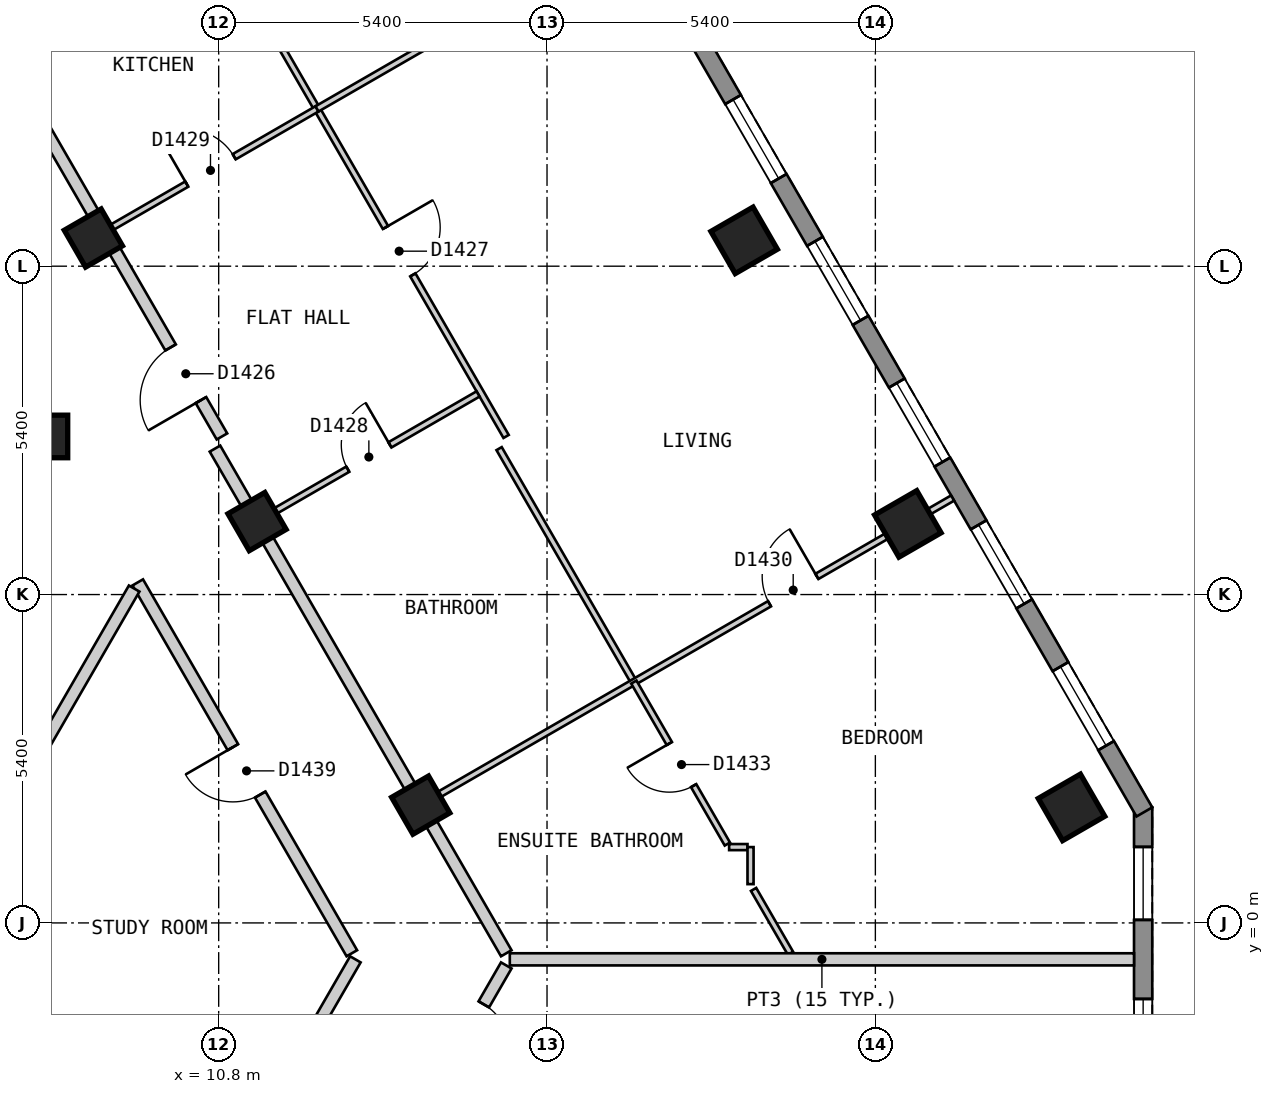
"""IFC4 building model, lengths in metres.
Left out: names, types, materials, properties, quantities, classifications, styles, units other than length and angle.
Written with IfcOpenShell. Run it as: python <this file> out.ifc"""

import sys

from ifc_helpers import new_model, si_unit, direction, frame, frame_2d, origin, origin_2d, place, context, subcontext, project, spatial, polyline, rectangle, outline, extrude, element, fill, save


model = new_model("IFC4")
c1 = context("Model", 3, precision=1e-05, world=origin(), true_north=direction((0.0, 1.0)))
c2 = subcontext(c1, "Body", "Model", "MODEL_VIEW")
j1 = project(units=[si_unit("LENGTHUNIT", "METRE"), si_unit("PLANEANGLEUNIT", "RADIAN")], contexts=[c1])
p1 = place(None, origin())
s1 = spatial("IfcSite", under=j1, at=p1, CompositionType="ELEMENT")
p2 = place(p1, origin())
s2 = spatial("IfcBuilding", under=s1, at=p2, CompositionType="ELEMENT")
p3 = place(p2, frame((0.0, 0.0, 172.2)))
s3 = spatial("IfcBuildingStorey", under=s2, at=p3, CompositionType="ELEMENT", Elevation=172.2)
for number, where, z_axis, x_axis in (
    (1, (24.826, 1.9, 0.0), (0.0, 0.0, 1.0), (-0.5, 0.866, 0.0)),
    (2, (22.134, 6.562, 0.0), (0.0, 0.0, 1.0), (-0.5, 0.866, 0.0)),
    (3, (19.442, 11.225, 0.0), (0.0, 0.0, 1.0), (-0.5, 0.866, 0.0)),
):
    element("IfcColumn", number, at=place(p3, frame(where, z_axis=z_axis, x_axis=x_axis)), inside=s3, PredefinedType="COLUMN", context=c2, shape_type="SweptSolid", body=[
        extrude(rectangle(XDim=0.8, YDim=0.8, at=origin_2d()), origin(), (0.0, 0.0, 1.0), 3.0),
    ])
for number, where, z_axis, x_axis in (
    (4, (14.123, 1.937, 0.0), (0.0, 0.0, 1.0), (-0.5, 0.866, 0.0)),
    (5, (11.431, 6.6, 0.0), (0.0, 0.0, 1.0), (-0.5, 0.866, 0.0)),
    (6, (7.967, 8.0, 0.0), (0.0, 0.0, 1.0), (1.0, 0.0, 0.0)),
    (7, (8.739, 11.263, 0.0), (0.0, 0.0, 1.0), (-0.5, 0.866, 0.0)),
):
    element("IfcColumn", number, at=place(p3, frame(where, z_axis=z_axis, x_axis=x_axis)), inside=s3, PredefinedType="COLUMN", context=c2, shape_type="SweptSolid", body=[
        extrude(rectangle(XDim=0.7, YDim=0.7, at=origin_2d()), origin(), (0.0, 0.0, 1.0), 3.0),
    ])
p4 = place(p3, frame((26.004, -3.1, 0.0), z_axis=(0.0, 0.0, 1.0), x_axis=(0.0, 1.0, 0.0)))
e8 = element("IfcWall", 8, at=p4, inside=s3, PredefinedType="SOLIDWALL", context=c2, shape_type="SweptSolid", body=[
    extrude(outline(polyline([(0.0, -0.15), (5.0, -0.15), (4.92, 0.15), (0.08, 0.15), (0.0, -0.15)])), origin(), (0.0, 0.0, 1.0), 2.7),
])
p5 = place(p4, frame((0.65, 0.0, 0.15)))
e9 = element("IfcOpeningElement", 9, at=p5, cuts=e8, PredefinedType="OPENING", context=c2, shape_type="SweptSolid", body=[
    extrude(rectangle(XDim=1.2, YDim=2.1, at=frame_2d((0.6, 1.05))), frame((0.0, 0.16, 0.0), z_axis=(0.0, -1.0, 0.0), x_axis=(1.0, 0.0, 0.0)), (0.0, 0.0, 1.0), 0.32),
])
p6 = place(p4, frame((3.15, 0.0, 0.15)))
e10 = element("IfcOpeningElement", 10, at=p6, cuts=e8, PredefinedType="OPENING", context=c2, shape_type="SweptSolid", body=[
    extrude(rectangle(XDim=1.2, YDim=2.1, at=frame_2d((0.6, 1.05))), frame((0.0, 0.16, 0.0), z_axis=(0.0, -1.0, 0.0), x_axis=(1.0, 0.0, 0.0)), (0.0, 0.0, 1.0), 0.32),
])
p7 = place(p3, frame((26.024, 1.825, 0.0), z_axis=(0.0, 0.0, 1.0), x_axis=(-0.500010537973, 0.866019319597, 0.0)))
e11 = element("IfcWall", 11, at=p7, inside=s3, PredefinedType="SOLIDWALL", context=c2, shape_type="SweptSolid", body=[
    extrude(outline(polyline([(0.0, -0.15), (22.863, -0.15), (22.783, 0.15), (0.08, 0.15), (0.0, -0.15)])), origin(), (0.0, 0.0, 1.0), 2.7),
])
p8 = place(p7, frame((1.259, 0.0, 0.15)))
e12 = element("IfcOpeningElement", 12, at=p8, cuts=e11, PredefinedType="OPENING", context=c2, shape_type="SweptSolid", body=[
    extrude(rectangle(XDim=1.5, YDim=2.1, at=frame_2d((0.75, 1.05))), frame((0.0, 0.16, 0.0), z_axis=(0.0, -1.0, 0.0), x_axis=(1.0, 0.0, 0.0)), (0.0, 0.0, 1.0), 0.32),
])
p9 = place(p7, frame((3.952, 0.0, 0.15)))
e13 = element("IfcOpeningElement", 13, at=p9, cuts=e11, PredefinedType="OPENING", context=c2, shape_type="SweptSolid", body=[
    extrude(rectangle(XDim=1.5, YDim=2.1, at=frame_2d((0.75, 1.05))), frame((0.0, 0.16, 0.0), z_axis=(0.0, -1.0, 0.0), x_axis=(1.0, 0.0, 0.0)), (0.0, 0.0, 1.0), 0.32),
])
p10 = place(p7, frame((6.644, 0.0, 0.15)))
e14 = element("IfcOpeningElement", 14, at=p10, cuts=e11, PredefinedType="OPENING", context=c2, shape_type="SweptSolid", body=[
    extrude(rectangle(XDim=1.5, YDim=2.1, at=frame_2d((0.75, 1.05))), frame((0.0, 0.16, 0.0), z_axis=(0.0, -1.0, 0.0), x_axis=(1.0, 0.0, 0.0)), (0.0, 0.0, 1.0), 0.32),
])
p11 = place(p7, frame((9.335, 0.0, 0.15)))
e15 = element("IfcOpeningElement", 15, at=p11, cuts=e11, PredefinedType="OPENING", context=c2, shape_type="SweptSolid", body=[
    extrude(rectangle(XDim=1.5, YDim=2.1, at=frame_2d((0.75, 1.05))), frame((0.0, 0.16, 0.0), z_axis=(0.0, -1.0, 0.0), x_axis=(1.0, 0.0, 0.0)), (0.0, 0.0, 1.0), 0.32),
])
p12 = place(p7, frame((12.028, 0.0, 0.15)))
e16 = element("IfcOpeningElement", 16, at=p12, cuts=e11, PredefinedType="OPENING", context=c2, shape_type="SweptSolid", body=[
    extrude(rectangle(XDim=1.5, YDim=2.1, at=frame_2d((0.75, 1.05))), frame((0.0, 0.16, 0.0), z_axis=(0.0, -1.0, 0.0), x_axis=(1.0, 0.0, 0.0)), (0.0, 0.0, 1.0), 0.32),
])
p13 = place(p7, frame((14.72, 0.0, 0.15)))
e17 = element("IfcOpeningElement", 17, at=p13, cuts=e11, PredefinedType="OPENING", context=c2, shape_type="SweptSolid", body=[
    extrude(rectangle(XDim=1.5, YDim=2.1, at=frame_2d((0.75, 1.05))), frame((0.0, 0.16, 0.0), z_axis=(0.0, -1.0, 0.0), x_axis=(1.0, 0.0, 0.0)), (0.0, 0.0, 1.0), 0.32),
])
p14 = place(p7, frame((17.411, 0.0, 0.15)))
e18 = element("IfcOpeningElement", 18, at=p14, cuts=e11, PredefinedType="OPENING", context=c2, shape_type="SweptSolid", body=[
    extrude(rectangle(XDim=1.5, YDim=2.1, at=frame_2d((0.75, 1.05))), frame((0.0, 0.16, 0.0), z_axis=(0.0, -1.0, 0.0), x_axis=(1.0, 0.0, 0.0)), (0.0, 0.0, 1.0), 0.32),
])
p15 = place(p7, frame((20.104, 0.0, 0.15)))
e19 = element("IfcOpeningElement", 19, at=p15, cuts=e11, PredefinedType="OPENING", context=c2, shape_type="SweptSolid", body=[
    extrude(rectangle(XDim=1.5, YDim=2.1, at=frame_2d((0.75, 1.05))), frame((0.0, 0.16, 0.0), z_axis=(0.0, -1.0, 0.0), x_axis=(1.0, 0.0, 0.0)), (0.0, 0.0, 1.0), 0.32),
])
p16 = place(p3, frame((9.469, 5.6, 0.0), z_axis=(0.0, 0.0, 1.0), x_axis=(0.499964524401, -0.866045884662, 0.0)))
e20 = element("IfcWall", 20, at=p16, inside=s3, PredefinedType="PARTITIONING", context=c2, shape_type="SweptSolid", body=[
    extrude(rectangle(XDim=7.042, YDim=0.2, at=frame_2d((3.521, 0.0))), origin(), (0.0, 0.0, 1.0), 2.7),
])
p17 = place(p16, frame((3.129, 0.0, 0.0)))
e21 = element("IfcOpeningElement", 21, at=p17, cuts=e20, PredefinedType="OPENING", context=c2, shape_type="SweptSolid", body=[
    extrude(rectangle(XDim=0.9, YDim=2.1, at=frame_2d((0.45, 1.05))), frame((0.0, 0.11, 0.0), z_axis=(0.0, -1.0, 0.0), x_axis=(1.0, 0.0, 0.0)), (0.0, 0.0, 1.0), 0.22),
])
p18 = place(p3, frame((10.739, 7.8, 0.0), z_axis=(0.0, 0.0, 1.0), x_axis=(0.499964311759, -0.86604600742, 0.0)))
e22 = element("IfcWall", 22, at=p18, inside=s3, PredefinedType="PARTITIONING", context=c2, shape_type="SweptSolid", body=[
    extrude(rectangle(XDim=9.583, YDim=0.2, at=frame_2d((4.792, 0.0))), origin(), (0.0, 0.0, 1.0), 2.7),
])
p19 = place(p3, frame((5.485, 17.3, 0.0), z_axis=(0.0, 0.0, 1.0), x_axis=(0.499965832213, -0.866045129667, 0.0)))
e23 = element("IfcWall", 23, at=p19, inside=s3, PredefinedType="PARTITIONING", context=c2, shape_type="SweptSolid", body=[
    extrude(rectangle(XDim=10.739, YDim=0.2, at=frame_2d((5.369, 0.0))), origin(), (0.0, 0.0, 1.0), 2.7),
])
p20 = place(p19, frame((9.048, 0.0, 0.0)))
e24 = element("IfcOpeningElement", 24, at=p20, cuts=e23, PredefinedType="OPENING", context=c2, shape_type="SweptSolid", body=[
    extrude(rectangle(XDim=1.0, YDim=2.1, at=frame_2d((0.5, 1.05))), frame((0.0, 0.11, 0.0), z_axis=(0.0, -1.0, 0.0), x_axis=(1.0, 0.0, 0.0)), (0.0, 0.0, 1.0), 0.22),
])
p21 = place(p19, frame((0.161, 0.0, 0.0)))
e25 = element("IfcOpeningElement", 25, at=p21, cuts=e23, PredefinedType="OPENING", context=c2, shape_type="SweptSolid", body=[
    extrude(rectangle(XDim=0.9, YDim=2.1, at=frame_2d((0.45, 1.05))), frame((0.0, 0.11, 0.0), z_axis=(0.0, -1.0, 0.0), x_axis=(1.0, 0.0, 0.0)), (0.0, 0.0, 1.0), 0.22),
])
p22 = place(p3, frame((7.028, 1.373, 0.0), z_axis=(0.0, 0.0, 1.0), x_axis=(0.499953126767, 0.866052464367, 0.0)))
e26 = element("IfcWall", 26, at=p22, inside=s3, PredefinedType="PARTITIONING", context=c2, shape_type="SweptSolid", body=[
    extrude(rectangle(XDim=4.764, YDim=0.2, at=frame_2d((2.382, 0.0))), origin(), (0.0, 0.0, 1.0), 2.7),
])
p23 = place(p3, frame((11.777, -2.8, 0.0), z_axis=(0.0, 0.0, 1.0), x_axis=(0.500085537782, 0.86597601289, 0.0)))
e27 = element("IfcWall", 27, at=p23, inside=s3, PredefinedType="PARTITIONING", context=c2, shape_type="SweptSolid", body=[
    extrude(rectangle(XDim=2.542, YDim=0.2, at=frame_2d((1.271, 0.0))), origin(), (0.0, 0.0, 1.0), 2.7),
])
p24 = place(p3, frame((14.318, -2.8, 0.0), z_axis=(0.0, 0.0, 1.0), x_axis=(0.49964693309, 0.866229151122, 0.0)))
e28 = element("IfcWall", 28, at=p24, inside=s3, PredefinedType="PARTITIONING", context=c2, shape_type="SweptSolid", body=[
    extrude(rectangle(XDim=2.426, YDim=0.2, at=frame_2d((1.213, 0.0))), origin(), (0.0, 0.0, 1.0), 2.7),
])
p25 = place(p24, frame((0.886, 0.0, 0.0)))
e29 = element("IfcOpeningElement", 29, at=p25, cuts=e28, PredefinedType="OPENING", context=c2, shape_type="SweptSolid", body=[
    extrude(rectangle(XDim=0.8, YDim=2.1, at=frame_2d((0.4, 1.05))), frame((0.0, 0.11, 0.0), z_axis=(0.0, -1.0, 0.0), x_axis=(1.0, 0.0, 0.0)), (0.0, 0.0, 1.0), 0.22),
])
p26 = place(p3, frame((15.412, 7.8, 0.0), z_axis=(0.0, 0.0, 1.0), x_axis=(0.499882970317, -0.866092960361, 0.0)))
e30 = element("IfcWall", 30, at=p26, inside=s3, PredefinedType="PARTITIONING", context=c2, shape_type="SweptSolid", body=[
    extrude(rectangle(XDim=4.433, YDim=0.1, at=frame_2d((2.216, 0.0))), origin(), (0.0, 0.0, 1.0), 2.7),
])
p27 = place(p3, frame((19.597, 0.551, 0.0), z_axis=(0.0, 0.0, 1.0), x_axis=(0.500576018574, -0.86569258379, 0.0)))
e31 = element("IfcWall", 31, at=p27, inside=s3, PredefinedType="PARTITIONING", context=c2, shape_type="SweptSolid", body=[
    extrude(rectangle(XDim=1.213, YDim=0.1, at=frame_2d((0.606, 0.0))), origin(), (0.0, 0.0, 1.0), 2.7),
])
p28 = place(p3, frame((9.827, 17.874, 0.0), z_axis=(0.0, 0.0, 1.0), x_axis=(0.499962189394, -0.866047232647, 0.0)))
e32 = element("IfcWall", 32, at=p28, inside=s3, PredefinedType="PARTITIONING", context=c2, shape_type="SweptSolid", body=[
    extrude(rectangle(XDim=11.401, YDim=0.1, at=frame_2d((5.701, 0.0))), origin(), (0.0, 0.0, 1.0), 2.7),
])
p29 = place(p28, frame((7.433, 0.0, 0.0)))
e33 = element("IfcOpeningElement", 33, at=p29, cuts=e32, PredefinedType="OPENING", context=c2, shape_type="SweptSolid", body=[
    extrude(rectangle(XDim=0.9, YDim=2.1, at=frame_2d((0.45, 1.05))), frame((0.0, 0.06, 0.0), z_axis=(0.0, -1.0, 0.0), x_axis=(1.0, 0.0, 0.0)), (0.0, 0.0, 1.0), 0.12),
])
p30 = place(p3, frame((19.195, 1.247, 0.0), z_axis=(0.0, 0.0, 1.0), x_axis=(1.0, 0.0, 0.0)))
e34 = element("IfcWall", 34, at=p30, inside=s3, PredefinedType="PARTITIONING", context=c2, shape_type="SweptSolid", body=[
    extrude(rectangle(XDim=0.302, YDim=0.1, at=frame_2d((0.151, 0.0))), origin(), (0.0, 0.0, 1.0), 2.7),
])
p31 = place(p3, frame((19.547, 0.638, 0.0), z_axis=(0.0, 0.0, 1.0), x_axis=(0.0, 1.0, 0.0)))
e35 = element("IfcWall", 35, at=p31, inside=s3, PredefinedType="PARTITIONING", context=c2, shape_type="SweptSolid", body=[
    extrude(rectangle(XDim=0.609, YDim=0.1, at=frame_2d((0.305, 0.0))), origin(), (0.0, 0.0, 1.0), 2.7),
])
p32 = place(p3, frame((14.21, 1.987, 0.0), z_axis=(0.0, 0.0, 1.0), x_axis=(0.866022959057, 0.500004234368, 0.0)))
e36 = element("IfcWall", 36, at=p32, inside=s3, PredefinedType="PARTITIONING", context=c2, shape_type="SweptSolid", body=[
    extrude(rectangle(XDim=10.0, YDim=0.1, at=frame_2d((5.0, 0.0))), origin(), (0.0, 0.0, 1.0), 2.7),
])
p33 = place(p32, frame((6.523, 0.0, 0.0)))
e37 = element("IfcOpeningElement", 37, at=p33, cuts=e36, PredefinedType="OPENING", context=c2, shape_type="SweptSolid", body=[
    extrude(rectangle(XDim=0.9, YDim=2.1, at=frame_2d((0.45, 1.05))), frame((0.0, 0.06, 0.0), z_axis=(0.0, -1.0, 0.0), x_axis=(1.0, 0.0, 0.0)), (0.0, 0.0, 1.0), 0.12),
])
p34 = place(p3, frame((11.518, 6.65, 0.0), z_axis=(0.0, 0.0, 1.0), x_axis=(0.865949381454, 0.500131651427, 0.0)))
e38 = element("IfcWall", 38, at=p34, inside=s3, PredefinedType="PARTITIONING", context=c2, shape_type="SweptSolid", body=[
    extrude(rectangle(XDim=4.097, YDim=0.1, at=frame_2d((2.049, 0.0))), origin(), (0.0, 0.0, 1.0), 2.7),
])
p35 = place(p34, frame((1.623, 0.0, 0.0)))
e39 = element("IfcOpeningElement", 39, at=p35, cuts=e38, PredefinedType="OPENING", context=c2, shape_type="SweptSolid", body=[
    extrude(rectangle(XDim=0.8, YDim=2.1, at=frame_2d((0.4, 1.05))), frame((0.0, 0.06, 0.0), z_axis=(0.0, -1.0, 0.0), x_axis=(1.0, 0.0, 0.0)), (0.0, 0.0, 1.0), 0.12),
])
p36 = place(p3, frame((8.999, 11.413, 0.0), z_axis=(0.0, 0.0, 1.0), x_axis=(0.865969252911, 0.500097243556, 0.0)))
e40 = element("IfcWall", 40, at=p36, inside=s3, PredefinedType="PARTITIONING", context=c2, shape_type="SweptSolid", body=[
    extrude(rectangle(XDim=3.947, YDim=0.1, at=frame_2d((1.974, 0.0))), origin(), (0.0, 0.0, 1.0), 2.7),
])
p37 = place(p36, frame((1.474, 0.0, 0.0)))
e41 = element("IfcOpeningElement", 41, at=p37, cuts=e40, PredefinedType="OPENING", context=c2, shape_type="SweptSolid", body=[
    extrude(rectangle(XDim=0.9, YDim=2.1, at=frame_2d((0.45, 1.05))), frame((0.0, 0.06, 0.0), z_axis=(0.0, -1.0, 0.0), x_axis=(1.0, 0.0, 0.0)), (0.0, 0.0, 1.0), 0.12),
])
p38 = place(p3, frame((15.588, -0.599, 0.0), z_axis=(0.0, 0.0, 1.0), x_axis=(1.0, 0.0, 0.0)))
e42 = element("IfcWall", 42, at=p38, inside=s3, PredefinedType="PARTITIONING", context=c2, shape_type="SweptSolid", body=[
    extrude(rectangle(XDim=10.266, YDim=0.2, at=frame_2d((5.133, 0.0))), origin(), (0.0, 0.0, 1.0), 2.7),
])
p39 = place(p3, frame((7.448, 14.1, 0.0), z_axis=(0.0, 0.0, 1.0), x_axis=(0.500013426303, 0.866017651966, 0.0)))
e43 = element("IfcWall", 43, at=p39, inside=s3, PredefinedType="PARTITIONING", context=c2, shape_type="SweptSolid", body=[
    extrude(rectangle(XDim=4.358, YDim=0.2, at=frame_2d((2.179, 0.0))), origin(), (0.0, 0.0, 1.0), 2.7),
])
p40 = place(p3, frame((17.628, 3.961, 0.0), z_axis=(0.0, 0.0, 1.0), x_axis=(0.50003162148, -0.866007146345, 0.0)))
e44 = element("IfcWall", 44, at=p40, inside=s3, PredefinedType="PARTITIONING", context=c2, shape_type="SweptSolid", body=[
    extrude(rectangle(XDim=3.076, YDim=0.1, at=frame_2d((1.538, 0.0))), origin(), (0.0, 0.0, 1.0), 2.7),
])
p41 = place(p40, frame((1.167, 0.0, 0.0)))
e45 = element("IfcOpeningElement", 45, at=p41, cuts=e44, PredefinedType="OPENING", context=c2, shape_type="SweptSolid", body=[
    extrude(rectangle(XDim=0.8, YDim=2.1, at=frame_2d((0.4, 1.05))), frame((0.0, 0.06, 0.0), z_axis=(0.0, -1.0, 0.0), x_axis=(1.0, 0.0, 0.0)), (0.0, 0.0, 1.0), 0.12),
])
p42 = place(p3, frame((12.417, 13.387, 0.0), z_axis=(0.0, 0.0, 1.0), x_axis=(0.866070981966, 0.499921047963, 0.0)))
e46 = element("IfcWall", 46, at=p42, inside=s3, PredefinedType="PARTITIONING", context=c2, shape_type="SweptSolid", body=[
    extrude(rectangle(XDim=5.853, YDim=0.1, at=frame_2d((2.927, 0.0))), origin(), (0.0, 0.0, 1.0), 2.7),
])
p43 = place(p42, frame((2.476, 0.0, 0.0)))
e47 = element("IfcOpeningElement", 47, at=p43, cuts=e46, PredefinedType="OPENING", context=c2, shape_type="SweptSolid", body=[
    extrude(rectangle(XDim=0.9, YDim=2.1, at=frame_2d((0.45, 1.05))), frame((0.0, 0.06, 0.0), z_axis=(0.0, -1.0, 0.0), x_axis=(1.0, 0.0, 0.0)), (0.0, 0.0, 1.0), 0.12),
])
p44 = place(p5, origin())
e48 = element("IfcWindow", 48, at=p44, inside=s3, PartitioningType="SINGLE_PANEL", PredefinedType="WINDOW", context=c2, shape_type="SweptSolid", body=[
    extrude(rectangle(XDim=1.2, YDim=2.1, at=frame_2d((0.6, 1.05))), frame((0.0, 0.03, 0.0), z_axis=(0.0, -1.0, 0.0), x_axis=(1.0, 0.0, 0.0)), (0.0, 0.0, 1.0), 0.06),
])
fill(e9, e48)
p45 = place(p6, origin())
e49 = element("IfcWindow", 49, at=p45, inside=s3, PartitioningType="SINGLE_PANEL", PredefinedType="WINDOW", context=c2, shape_type="SweptSolid", body=[
    extrude(rectangle(XDim=1.2, YDim=2.1, at=frame_2d((0.6, 1.05))), frame((0.0, 0.03, 0.0), z_axis=(0.0, -1.0, 0.0), x_axis=(1.0, 0.0, 0.0)), (0.0, 0.0, 1.0), 0.06),
])
fill(e10, e49)
p46 = place(p8, origin())
e50 = element("IfcWindow", 50, at=p46, inside=s3, PartitioningType="SINGLE_PANEL", PredefinedType="WINDOW", context=c2, shape_type="SweptSolid", body=[
    extrude(rectangle(XDim=1.5, YDim=2.1, at=frame_2d((0.75, 1.05))), frame((0.0, 0.03, 0.0), z_axis=(0.0, -1.0, 0.0), x_axis=(1.0, 0.0, 0.0)), (0.0, 0.0, 1.0), 0.06),
])
fill(e12, e50)
p47 = place(p9, origin())
e51 = element("IfcWindow", 51, at=p47, inside=s3, PartitioningType="SINGLE_PANEL", PredefinedType="WINDOW", context=c2, shape_type="SweptSolid", body=[
    extrude(rectangle(XDim=1.5, YDim=2.1, at=frame_2d((0.75, 1.05))), frame((0.0, 0.03, 0.0), z_axis=(0.0, -1.0, 0.0), x_axis=(1.0, 0.0, 0.0)), (0.0, 0.0, 1.0), 0.06),
])
fill(e13, e51)
p48 = place(p10, origin())
e52 = element("IfcWindow", 52, at=p48, inside=s3, PartitioningType="SINGLE_PANEL", PredefinedType="WINDOW", context=c2, shape_type="SweptSolid", body=[
    extrude(rectangle(XDim=1.5, YDim=2.1, at=frame_2d((0.75, 1.05))), frame((0.0, 0.03, 0.0), z_axis=(0.0, -1.0, 0.0), x_axis=(1.0, 0.0, 0.0)), (0.0, 0.0, 1.0), 0.06),
])
fill(e14, e52)
p49 = place(p11, origin())
e53 = element("IfcWindow", 53, at=p49, inside=s3, PartitioningType="SINGLE_PANEL", PredefinedType="WINDOW", context=c2, shape_type="SweptSolid", body=[
    extrude(rectangle(XDim=1.5, YDim=2.1, at=frame_2d((0.75, 1.05))), frame((0.0, 0.03, 0.0), z_axis=(0.0, -1.0, 0.0), x_axis=(1.0, 0.0, 0.0)), (0.0, 0.0, 1.0), 0.06),
])
fill(e15, e53)
p50 = place(p12, origin())
e54 = element("IfcWindow", 54, at=p50, inside=s3, PartitioningType="SINGLE_PANEL", PredefinedType="WINDOW", context=c2, shape_type="SweptSolid", body=[
    extrude(rectangle(XDim=1.5, YDim=2.1, at=frame_2d((0.75, 1.05))), frame((0.0, 0.03, 0.0), z_axis=(0.0, -1.0, 0.0), x_axis=(1.0, 0.0, 0.0)), (0.0, 0.0, 1.0), 0.06),
])
fill(e16, e54)
p51 = place(p25, origin())
e55 = element("IfcDoor", 55, at=p51, inside=s3, OperationType="SINGLE_SWING_LEFT", PredefinedType="DOOR", context=c2, shape_type="SweptSolid", body=[
    extrude(rectangle(XDim=0.8, YDim=2.1, at=frame_2d((0.4, 1.05))), frame((0.0, 0.025, 0.0), z_axis=(0.0, -1.0, 0.0), x_axis=(1.0, 0.0, 0.0)), (0.0, 0.0, 1.0), 0.05),
])
fill(e29, e55)
p52 = place(p20, origin())
e56 = element("IfcDoor", 56, at=p52, inside=s3, OperationType="SINGLE_SWING_RIGHT", PredefinedType="DOOR", context=c2, shape_type="SweptSolid", body=[
    extrude(rectangle(XDim=1.0, YDim=2.1, at=frame_2d((0.5, 1.05))), frame((0.0, 0.025, 0.0), z_axis=(0.0, -1.0, 0.0), x_axis=(1.0, 0.0, 0.0)), (0.0, 0.0, 1.0), 0.05),
])
fill(e24, e56)
p53 = place(p29, origin())
e57 = element("IfcDoor", 57, at=p53, inside=s3, OperationType="SINGLE_SWING_LEFT", PredefinedType="DOOR", context=c2, shape_type="SweptSolid", body=[
    extrude(rectangle(XDim=0.9, YDim=2.1, at=frame_2d((0.45, 1.05))), frame((0.0, 0.025, 0.0), z_axis=(0.0, -1.0, 0.0), x_axis=(1.0, 0.0, 0.0)), (0.0, 0.0, 1.0), 0.05),
])
fill(e33, e57)
p54 = place(p35, origin())
e58 = element("IfcDoor", 58, at=p54, inside=s3, OperationType="SINGLE_SWING_RIGHT", PredefinedType="DOOR", context=c2, shape_type="SweptSolid", body=[
    extrude(rectangle(XDim=0.8, YDim=2.1, at=frame_2d((0.4, 1.05))), frame((0.0, 0.025, 0.0), z_axis=(0.0, -1.0, 0.0), x_axis=(1.0, 0.0, 0.0)), (0.0, 0.0, 1.0), 0.05),
])
fill(e39, e58)
p55 = place(p37, origin())
e59 = element("IfcDoor", 59, at=p55, inside=s3, OperationType="SINGLE_SWING_LEFT", PredefinedType="DOOR", context=c2, shape_type="SweptSolid", body=[
    extrude(rectangle(XDim=0.9, YDim=2.1, at=frame_2d((0.45, 1.05))), frame((0.0, 0.025, 0.0), z_axis=(0.0, -1.0, 0.0), x_axis=(1.0, 0.0, 0.0)), (0.0, 0.0, 1.0), 0.05),
])
fill(e41, e59)
p56 = place(p33, origin())
e60 = element("IfcDoor", 60, at=p56, inside=s3, OperationType="SINGLE_SWING_RIGHT", PredefinedType="DOOR", context=c2, shape_type="SweptSolid", body=[
    extrude(rectangle(XDim=0.9, YDim=2.1, at=frame_2d((0.45, 1.05))), frame((0.0, 0.025, 0.0), z_axis=(0.0, -1.0, 0.0), x_axis=(1.0, 0.0, 0.0)), (0.0, 0.0, 1.0), 0.05),
])
fill(e37, e60)
p57 = place(p41, origin())
e61 = element("IfcDoor", 61, at=p57, inside=s3, OperationType="SINGLE_SWING_LEFT", PredefinedType="DOOR", context=c2, shape_type="SweptSolid", body=[
    extrude(rectangle(XDim=0.8, YDim=2.1, at=frame_2d((0.4, 1.05))), frame((0.0, 0.025, 0.0), z_axis=(0.0, -1.0, 0.0), x_axis=(1.0, 0.0, 0.0)), (0.0, 0.0, 1.0), 0.05),
])
fill(e45, e61)
p58 = place(p17, origin())
e62 = element("IfcDoor", 62, at=p58, inside=s3, OperationType="SINGLE_SWING_LEFT", PredefinedType="DOOR", context=c2, shape_type="SweptSolid", body=[
    extrude(rectangle(XDim=0.9, YDim=2.1, at=frame_2d((0.45, 1.05))), frame((0.0, 0.025, 0.0), z_axis=(0.0, -1.0, 0.0), x_axis=(1.0, 0.0, 0.0)), (0.0, 0.0, 1.0), 0.05),
])
fill(e21, e62)
save(model, sys.argv[1])
